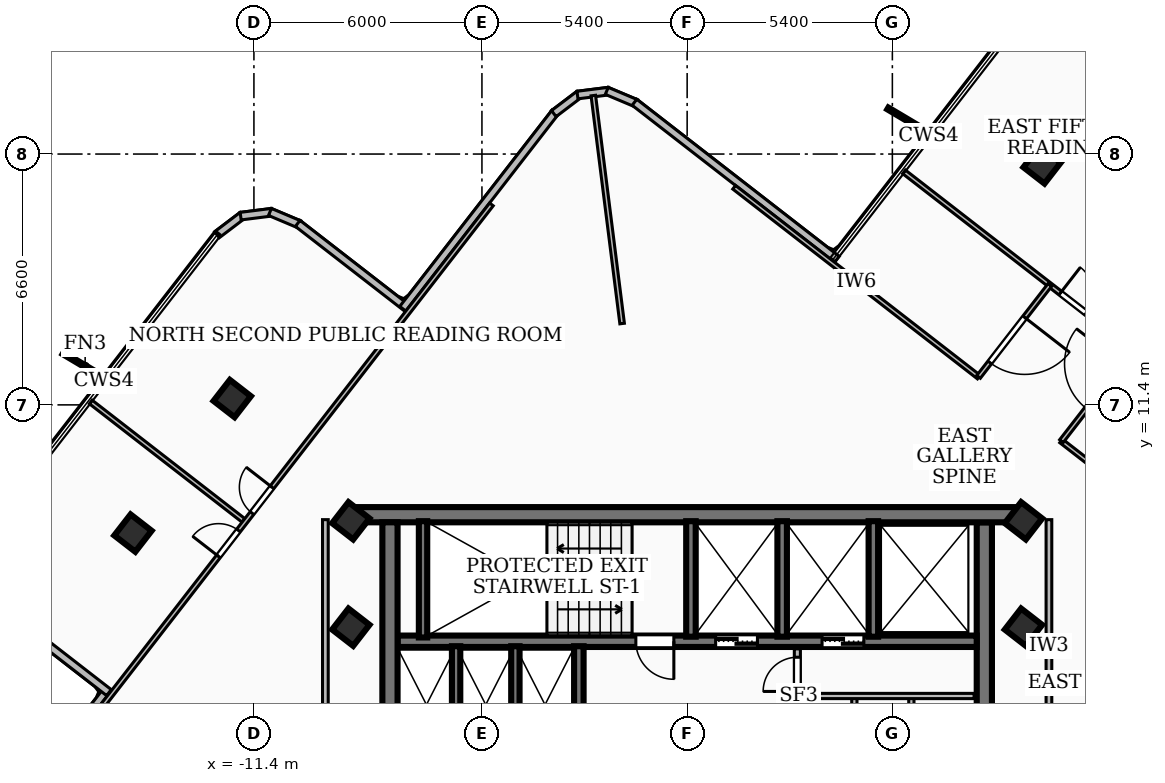
"""IFC4 building model, lengths in metres.
Left out: names, types, materials, properties, quantities, classifications, styles, units other than length and angle.
Written with IfcOpenShell. Run it as: python <this file> out.ifc"""

import sys

from ifc_helpers import new_model, si_unit, direction, frame, frame_2d, origin, origin_2d, place, context, subcontext, project, spatial, rectangle, extrude, element, fill, save


model = new_model("IFC4")
c1 = context("Model", 3, precision=1e-05, world=origin(), true_north=direction((0.0, 1.0)))
c2 = subcontext(c1, "Body", "Model", "MODEL_VIEW")
j1 = project(units=[si_unit("LENGTHUNIT", "METRE"), si_unit("PLANEANGLEUNIT", "RADIAN")], contexts=[c1])
p1 = place(None, origin())
s1 = spatial("IfcSite", under=j1, at=p1, CompositionType="ELEMENT")
p2 = place(p1, origin())
s2 = spatial("IfcBuilding", under=s1, at=p2, CompositionType="ELEMENT")
p3 = place(p2, frame((0.0, 0.0, 261.18)))
s3 = spatial("IfcBuildingStorey", under=s2, at=p3, CompositionType="ELEMENT", Elevation=261.18)
p4 = place(p3, frame((-8.78, 8.51, 0.0), z_axis=(0.0, 0.0, 1.0), x_axis=(1.0, 0.0, 0.0)))
e1 = element("IfcWall", 1, at=p4, inside=s3, PredefinedType="SHEAR", context=c2, shape_type="SweptSolid", body=[
    extrude(rectangle(XDim=17.56, YDim=0.4, at=frame_2d((8.78, 0.0))), origin(), (0.0, 0.0, 1.0), 3.16),
])
for number, where, z_axis, x_axis in (
    (2, (-7.82, 1.95, 0.0), (0.0, 0.0, 1.0), (0.0, 1.0, 0.0)),
    (3, (7.82, 8.31, 0.0), (0.0, 0.0, 1.0), (0.0, -1.0, 0.0)),
):
    element("IfcWall", number, at=place(p3, frame(where, z_axis=z_axis, x_axis=x_axis)), inside=s3, PredefinedType="SHEAR", context=c2, shape_type="SweptSolid", body=[
        extrude(rectangle(XDim=6.36, YDim=0.4, at=frame_2d((3.18, 0.0))), origin(), (0.0, 0.0, 1.0), 3.16),
    ])
p5 = place(p3, frame((7.62, 5.18, 0.0), z_axis=(0.0, 0.0, 1.0), x_axis=(-1.0, 0.0, 0.0)))
e4 = element("IfcWall", 4, at=p5, inside=s3, PredefinedType="SOLIDWALL", context=c2, shape_type="SweptSolid", body=[
    extrude(rectangle(XDim=15.24, YDim=0.3, at=frame_2d((7.62, 0.0))), origin(), (0.0, 0.0, 1.0), 3.16),
])
p6 = place(p5, frame((5.77, 0.0, 0.0)))
e5 = element("IfcOpeningElement", 5, at=p6, cuts=e4, PredefinedType="OPENING", context=c2, shape_type="SweptSolid", body=[
    extrude(rectangle(XDim=1.1, YDim=2.15, at=frame_2d((0.55, 1.075))), frame((0.0, 0.16, 0.0), z_axis=(0.0, -1.0, 0.0), x_axis=(1.0, 0.0, 0.0)), (0.0, 0.0, 1.0), 0.32),
])
p7 = place(p5, frame((2.97, 0.0, 0.0)))
e6 = element("IfcOpeningElement", 6, at=p7, cuts=e4, PredefinedType="OPENING", context=c2, shape_type="SweptSolid", body=[
    extrude(rectangle(XDim=1.1, YDim=2.15, at=frame_2d((0.55, 1.075))), frame((0.0, 0.16, 0.0), z_axis=(0.0, -1.0, 0.0), x_axis=(1.0, 0.0, 0.0)), (0.0, 0.0, 1.0), 0.32),
])
p8 = place(p5, frame((7.97, 0.0, 0.0)))
e7 = element("IfcOpeningElement", 7, at=p8, cuts=e4, PredefinedType="OPENING", context=c2, shape_type="SweptSolid", body=[
    extrude(rectangle(XDim=1.0, YDim=2.1, at=frame_2d((0.5, 1.05))), frame((0.0, 0.16, 0.0), z_axis=(0.0, -1.0, 0.0), x_axis=(1.0, 0.0, 0.0)), (0.0, 0.0, 1.0), 0.32),
])
p9 = place(p3, frame((-6.95, 5.28, 0.0), z_axis=(0.0, 0.0, 1.0), x_axis=(0.0, 1.0, 0.0)))
e8 = element("IfcWall", 8, at=p9, inside=s3, PredefinedType="SOLIDWALL", context=c2, shape_type="SweptSolid", body=[
    extrude(rectangle(XDim=3.06, YDim=0.22, at=frame_2d((1.53, 0.0))), origin(), (0.0, 0.0, 1.0), 3.16),
])
for number, where, z_axis, x_axis in (
    (9, (0.1, 5.3, 0.0), (0.0, 0.0, 1.0), (0.0, 1.0, 0.0)),
    (10, (2.5, 5.3, 0.0), (0.0, 0.0, 1.0), (0.0, 1.0, 0.0)),
    (11, (4.9, 5.3, 0.0), (0.0, 0.0, 1.0), (0.0, 1.0, 0.0)),
):
    element("IfcWall", number, at=place(p3, frame(where, z_axis=z_axis, x_axis=x_axis)), inside=s3, PredefinedType="SOLIDWALL", context=c2, shape_type="SweptSolid", body=[
        extrude(rectangle(XDim=3.04, YDim=0.25, at=frame_2d((1.52, 0.0))), origin(), (0.0, 0.0, 1.0), 3.16),
    ])
p10 = place(p3, frame((-2.85, 1.98, 0.0), z_axis=(0.0, 0.0, 1.0), x_axis=(0.0, 1.0, 0.0)))
e12 = element("IfcWall", 12, at=p10, inside=s3, PredefinedType="SOLIDWALL", context=c2, shape_type="SweptSolid", body=[
    extrude(rectangle(XDim=3.07, YDim=0.25, at=frame_2d((1.535, 0.0))), origin(), (0.0, 0.0, 1.0), 3.16),
])
for number, where, z_axis, x_axis in (
    (13, (-6.08, 1.98, 0.0), (0.0, 0.0, 1.0), (0.0, 1.0, 0.0)),
    (14, (-4.52, 1.98, 0.0), (0.0, 0.0, 1.0), (0.0, 1.0, 0.0)),
):
    element("IfcWall", number, at=place(p3, frame(where, z_axis=z_axis, x_axis=x_axis)), inside=s3, PredefinedType="SOLIDWALL", context=c2, shape_type="SweptSolid", body=[
        extrude(rectangle(XDim=3.07, YDim=0.22, at=frame_2d((1.535, 0.0))), origin(), (0.0, 0.0, 1.0), 3.16),
    ])
for number, where, z_axis, x_axis in (
    (15, (-8.85, 5.55, 0.0), (0.0, 0.0, 1.0), (0.613, 0.79, 0.0)),
    (16, (8.85, 5.55, 0.0), (0.0, 0.0, 1.0), (0.613, 0.79, 0.0)),
    (17, (-8.85, 8.35, 0.0), (0.0, 0.0, 1.0), (0.613, 0.79, 0.0)),
    (18, (8.85, 8.35, 0.0), (0.0, 0.0, 1.0), (0.613, 0.79, 0.0)),
    (19, (9.341, 17.714, 0.0), (0.0, 0.0, 1.0), (0.613, 0.79, 0.0)),
    (20, (-11.971, 11.566, 0.0), (0.0, 0.0, 1.0), (0.613, 0.79, 0.0)),
    (21, (-14.583, 8.026, 0.0), (0.0, 0.0, 1.0), (0.613, 0.79, 0.0)),
):
    element("IfcColumn", number, at=place(p3, frame(where, z_axis=z_axis, x_axis=x_axis)), inside=s3, PredefinedType="COLUMN", context=c2, shape_type="SweptSolid", body=[
        extrude(rectangle(XDim=0.7, YDim=0.7, at=origin_2d()), origin(), (0.0, 0.0, 1.0), 3.42),
    ])
p11 = place(p3, frame((-19.362, -1.386, 0.0), z_axis=(0.0, 0.0, 1.0), x_axis=(0.613007625303, 0.790076990755, 0.0)))
e22 = element("IfcWall", 22, at=p11, inside=s3, PredefinedType="SOLIDWALL", context=c2, shape_type="SweptSolid", body=[
    extrude(rectangle(XDim=6.742, YDim=0.2, at=frame_2d((3.371, 0.0))), origin(), (0.0, 0.0, 1.0), 3.16),
])
p12 = place(p3, frame((-15.215, 3.829, 0.0), z_axis=(0.0, 0.0, 1.0), x_axis=(-0.790311198889, 0.612705646221, 0.0)))
e23 = element("IfcWall", 23, at=p12, inside=s3, PredefinedType="SOLIDWALL", context=c2, shape_type="SweptSolid", body=[
    extrude(rectangle(XDim=3.643, YDim=0.2, at=frame_2d((1.821, 0.0))), origin(), (0.0, 0.0, 1.0), 3.16),
])
p13 = place(p3, frame((-12.372, 15.877, 0.0), z_axis=(0.0, 0.0, 1.0), x_axis=(0.796493049564, 0.60464768419, 0.0)))
e24 = element("IfcWall", 24, at=p13, inside=s3, PredefinedType="SOLIDWALL", context=c2, shape_type="SweptSolid", body=[
    extrude(rectangle(XDim=0.839, YDim=0.2, at=frame_2d((0.419, 0.0))), origin(), (0.0, 0.0, 1.0), 3.16),
])
p14 = place(p3, frame((-11.749, 16.366, 0.0), z_axis=(0.0, 0.0, 1.0), x_axis=(0.992182038023, 0.124799052175, 0.0)))
e25 = element("IfcWall", 25, at=p14, inside=s3, PredefinedType="SOLIDWALL", context=c2, shape_type="SweptSolid", body=[
    extrude(rectangle(XDim=0.825, YDim=0.2, at=frame_2d((0.413, 0.0))), origin(), (0.0, 0.0, 1.0), 3.16),
])
p15 = place(p3, frame((-10.978, 16.476, 0.0), z_axis=(0.0, 0.0, 1.0), x_axis=(0.921328331513, -0.388785423532, 0.0)))
e26 = element("IfcWall", 26, at=p15, inside=s3, PredefinedType="SOLIDWALL", context=c2, shape_type="SweptSolid", body=[
    extrude(rectangle(XDim=0.839, YDim=0.2, at=frame_2d((0.419, 0.0))), origin(), (0.0, 0.0, 1.0), 3.16),
])
p16 = place(p3, frame((-10.248, 16.175, 0.0), z_axis=(0.0, 0.0, 1.0), x_axis=(0.790239683444, -0.612797880797, 0.0)))
e27 = element("IfcWall", 27, at=p16, inside=s3, PredefinedType="SOLIDWALL", context=c2, shape_type="SweptSolid", body=[
    extrude(rectangle(XDim=3.641, YDim=0.2, at=frame_2d((1.82, 0.0))), origin(), (0.0, 0.0, 1.0), 3.16),
])
p17 = place(p3, frame((-7.483, 13.93, 0.0), z_axis=(0.0, 0.0, 1.0), x_axis=(0.612826373036, 0.790217588081, 0.0)))
e28 = element("IfcWall", 28, at=p17, inside=s3, PredefinedType="SOLIDWALL", context=c2, shape_type="SweptSolid", body=[
    extrude(rectangle(XDim=6.542, YDim=0.2, at=frame_2d((3.271, 0.0))), origin(), (0.0, 0.0, 1.0), 3.16),
])
p18 = place(p3, frame((-3.509, 19.064, 0.0), z_axis=(0.0, 0.0, 1.0), x_axis=(0.797053904317, 0.603908166539, 0.0)))
e29 = element("IfcWall", 29, at=p18, inside=s3, PredefinedType="SOLIDWALL", context=c2, shape_type="SweptSolid", body=[
    extrude(rectangle(XDim=0.838, YDim=0.2, at=frame_2d((0.419, 0.0))), origin(), (0.0, 0.0, 1.0), 3.16),
])
p19 = place(p3, frame((-2.886, 19.552, 0.0), z_axis=(0.0, 0.0, 1.0), x_axis=(0.992182038023, 0.124799052175, 0.0)))
e30 = element("IfcWall", 30, at=p19, inside=s3, PredefinedType="SOLIDWALL", context=c2, shape_type="SweptSolid", body=[
    extrude(rectangle(XDim=0.825, YDim=0.2, at=frame_2d((0.413, 0.0))), origin(), (0.0, 0.0, 1.0), 3.16),
])
p20 = place(p3, frame((-2.115, 19.662, 0.0), z_axis=(0.0, 0.0, 1.0), x_axis=(0.921569528133, -0.388213349612, 0.0)))
e31 = element("IfcWall", 31, at=p20, inside=s3, PredefinedType="SOLIDWALL", context=c2, shape_type="SweptSolid", body=[
    extrude(rectangle(XDim=0.838, YDim=0.2, at=frame_2d((0.419, 0.0))), origin(), (0.0, 0.0, 1.0), 3.16),
])
p21 = place(p3, frame((-1.386, 19.362, 0.0), z_axis=(0.0, 0.0, 1.0), x_axis=(0.790076990755, -0.613007625303, 0.0)))
e32 = element("IfcWall", 32, at=p21, inside=s3, PredefinedType="SOLIDWALL", context=c2, shape_type="SweptSolid", body=[
    extrude(rectangle(XDim=6.742, YDim=0.2, at=frame_2d((3.371, 0.0))), origin(), (0.0, 0.0, 1.0), 3.16),
])
p22 = place(p3, frame((2.9, 2.04, 0.0), z_axis=(0.0, 0.0, 1.0), x_axis=(0.0, 1.0, 0.0)))
e33 = element("IfcWall", 33, at=p22, inside=s3, PredefinedType="PARTITIONING", context=c2, shape_type="SweptSolid", body=[
    extrude(rectangle(XDim=2.94, YDim=0.16, at=frame_2d((1.47, 0.0))), origin(), (0.0, 0.0, 1.0), 2.39),
])
p23 = place(p22, frame((1.82, 0.0, 0.0)))
e34 = element("IfcOpeningElement", 34, at=p23, cuts=e33, PredefinedType="OPENING", context=c2, shape_type="SweptSolid", body=[
    extrude(rectangle(XDim=0.9, YDim=2.06, at=frame_2d((0.45, 1.03))), frame((0.0, 0.09, 0.0), z_axis=(0.0, -1.0, 0.0), x_axis=(1.0, 0.0, 0.0)), (0.0, 0.0, 1.0), 0.18),
])
p24 = place(p3, frame((2.9, 3.74, 0.0), z_axis=(0.0, 0.0, 1.0), x_axis=(1.0, 0.0, 0.0)))
e35 = element("IfcWall", 35, at=p24, inside=s3, PredefinedType="PARTITIONING", context=c2, shape_type="SweptSolid", body=[
    extrude(rectangle(XDim=4.65, YDim=0.138, at=frame_2d((2.325, 0.0))), origin(), (0.0, 0.0, 1.0), 3.16),
])
for number, where, z_axis, x_axis in (
    (36, (4.4, 1.85, 0.0), (0.0, 0.0, 1.0), (0.0, 1.0, 0.0)),
    (37, (5.9, 1.85, 0.0), (0.0, 0.0, 1.0), (0.0, 1.0, 0.0)),
):
    element("IfcWall", number, at=place(p3, frame(where, z_axis=z_axis, x_axis=x_axis)), inside=s3, PredefinedType="PARTITIONING", context=c2, shape_type="SweptSolid", body=[
        extrude(rectangle(XDim=1.89, YDim=0.138, at=frame_2d((0.945, 0.0))), origin(), (0.0, 0.0, 1.0), 2.39),
    ])
p25 = place(p3, frame((-9.52, 1.75, 0.0), z_axis=(0.0, 0.0, 1.0), x_axis=(0.0, 1.0, 0.0)))
e38 = element("IfcWall", 38, at=p25, inside=s3, PredefinedType="PARTITIONING", context=c2, shape_type="SweptSolid", body=[
    extrude(rectangle(XDim=6.63, YDim=0.15, at=frame_2d((3.315, 0.0))), origin(), (0.0, 0.0, 1.0), 2.53),
])
p26 = place(p3, frame((9.52, 1.75, 0.0), z_axis=(0.0, 0.0, 1.0), x_axis=(0.0, 1.0, 0.0)))
e39 = element("IfcWall", 39, at=p26, inside=s3, PredefinedType="PARTITIONING", context=c2, shape_type="SweptSolid", body=[
    extrude(rectangle(XDim=6.63, YDim=0.15, at=frame_2d((3.315, 0.0))), origin(), (0.0, 0.0, 1.0), 3.16),
])
p27 = place(p3, frame((-1.711, 13.54, 0.0), z_axis=(0.0, 0.0, 1.0), x_axis=(-0.125366398214, 0.992110511082, 0.0)))
e40 = element("IfcWall", 40, at=p27, inside=s3, PredefinedType="PARTITIONING", context=c2, shape_type="SweptSolid", body=[
    extrude(rectangle(XDim=6.047, YDim=0.12, at=frame_2d((3.023, 0.0))), origin(), (0.0, 0.0, 1.0), 3.16),
])
p28 = place(p3, frame((7.676, 12.131, 0.0), z_axis=(0.0, 0.0, 1.0), x_axis=(-0.790137186805, 0.61293003355, 0.0)))
e41 = element("IfcWall", 41, at=p28, inside=s3, PredefinedType="PARTITIONING", context=c2, shape_type="SweptSolid", body=[
    extrude(rectangle(XDim=8.149, YDim=0.12, at=frame_2d((4.075, 0.0))), origin(), (0.0, 0.0, 1.0), 3.16),
])
p29 = place(p3, frame((16.122, 5.578, 0.0), z_axis=(0.0, 0.0, 1.0), x_axis=(-0.7900346363, 0.613062210094, 0.0)))
e42 = element("IfcWall", 42, at=p29, inside=s3, PredefinedType="PARTITIONING", context=c2, shape_type="SweptSolid", body=[
    extrude(rectangle(XDim=7.95, YDim=0.12, at=frame_2d((3.975, 0.0))), origin(), (0.0, 0.0, 1.0), 2.53),
])
p30 = place(p3, frame((9.544, 14.555, 0.0), z_axis=(0.0, 0.0, 1.0), x_axis=(-0.612990234131, -0.79009048397, 0.0)))
e43 = element("IfcWall", 43, at=p30, inside=s3, PredefinedType="PARTITIONING", context=c2, shape_type="SweptSolid", body=[
    extrude(rectangle(XDim=3.06, YDim=0.12, at=frame_2d((1.53, 0.0))), origin(), (0.0, 0.0, 1.0), 2.53),
])
p31 = place(p30, frame((1.08, 0.0, 0.0)))
e44 = element("IfcOpeningElement", 44, at=p31, cuts=e43, PredefinedType="OPENING", context=c2, shape_type="SweptSolid", body=[
    extrude(rectangle(XDim=1.5, YDim=2.12, at=frame_2d((0.75, 1.06))), frame((0.0, 0.07, 0.0), z_axis=(0.0, -1.0, 0.0), x_axis=(1.0, 0.0, 0.0)), (0.0, 0.0, 1.0), 0.14),
])
p32 = place(p3, frame((9.849, 10.446, 0.0), z_axis=(0.0, 0.0, 1.0), x_axis=(0.612945563076, 0.790125139902, 0.0)))
e45 = element("IfcWall", 45, at=p32, inside=s3, PredefinedType="PARTITIONING", context=c2, shape_type="SweptSolid", body=[
    extrude(rectangle(XDim=3.059, YDim=0.12, at=frame_2d((1.53, 0.0))), origin(), (0.0, 0.0, 1.0), 3.16),
])
p33 = place(p32, frame((1.08, 0.0, 0.0)))
e46 = element("IfcOpeningElement", 46, at=p33, cuts=e45, PredefinedType="OPENING", context=c2, shape_type="SweptSolid", body=[
    extrude(rectangle(XDim=1.5, YDim=2.12, at=frame_2d((0.75, 1.06))), frame((0.0, 0.07, 0.0), z_axis=(0.0, -1.0, 0.0), x_axis=(1.0, 0.0, 0.0)), (0.0, 0.0, 1.0), 0.14),
])
p34 = place(p3, frame((5.707, 17.531, 0.0), z_axis=(0.0, 0.0, 1.0), x_axis=(0.790153529347, -0.612908965557, 0.0)))
e47 = element("IfcWall", 47, at=p34, inside=s3, PredefinedType="PARTITIONING", context=c2, shape_type="SweptSolid", body=[
    extrude(rectangle(XDim=12.671, YDim=0.12, at=frame_2d((6.335, 0.0))), origin(), (0.0, 0.0, 1.0), 2.53),
])
p35 = place(p34, frame((6.405, 0.0, 0.0)))
e48 = element("IfcOpeningElement", 48, at=p35, cuts=e47, PredefinedType="OPENING", context=c2, shape_type="SweptSolid", body=[
    extrude(rectangle(XDim=0.86, YDim=2.04, at=frame_2d((0.43, 1.02))), frame((0.0, 0.07, 0.0), z_axis=(0.0, -1.0, 0.0), x_axis=(1.0, 0.0, 0.0)), (0.0, 0.0, 1.0), 0.14),
])
p36 = place(p34, frame((5.205, 0.0, 0.0)))
e49 = element("IfcOpeningElement", 49, at=p36, cuts=e47, PredefinedType="OPENING", context=c2, shape_type="SweptSolid", body=[
    extrude(rectangle(XDim=0.86, YDim=2.04, at=frame_2d((0.43, 1.02))), frame((0.0, 0.07, 0.0), z_axis=(0.0, -1.0, 0.0), x_axis=(1.0, 0.0, 0.0)), (0.0, 0.0, 1.0), 0.14),
])
p37 = place(p3, frame((-11.676, 8.361, 0.0), z_axis=(0.0, 0.0, 1.0), x_axis=(-0.790227868115, 0.612813117071, 0.0)))
e50 = element("IfcWall", 50, at=p37, inside=s3, PredefinedType="PARTITIONING", context=c2, shape_type="SweptSolid", body=[
    extrude(rectangle(XDim=5.085, YDim=0.12, at=frame_2d((2.542, 0.0))), origin(), (0.0, 0.0, 1.0), 3.16),
])
p38 = place(p3, frame((-17.555, 0.683, 0.0), z_axis=(0.0, 0.0, 1.0), x_axis=(0.61291959311, 0.790145285617, 0.0)))
e51 = element("IfcWall", 51, at=p38, inside=s3, PredefinedType="PARTITIONING", context=c2, shape_type="SweptSolid", body=[
    extrude(rectangle(XDim=20.239, YDim=0.12, at=frame_2d((10.12, 0.0))), origin(), (0.0, 0.0, 1.0), 2.53),
])
p39 = place(p38, frame((9.96, 0.0, 0.0)))
e52 = element("IfcOpeningElement", 52, at=p39, cuts=e51, PredefinedType="OPENING", context=c2, shape_type="SweptSolid", body=[
    extrude(rectangle(XDim=0.86, YDim=2.04, at=frame_2d((0.43, 1.02))), frame((0.0, 0.07, 0.0), z_axis=(0.0, -1.0, 0.0), x_axis=(1.0, 0.0, 0.0)), (0.0, 0.0, 1.0), 0.14),
])
p40 = place(p38, frame((8.52, 0.0, 0.0)))
e53 = element("IfcOpeningElement", 53, at=p40, cuts=e51, PredefinedType="OPENING", context=c2, shape_type="SweptSolid", body=[
    extrude(rectangle(XDim=0.86, YDim=2.04, at=frame_2d((0.43, 1.02))), frame((0.0, 0.07, 0.0), z_axis=(0.0, -1.0, 0.0), x_axis=(1.0, 0.0, 0.0)), (0.0, 0.0, 1.0), 0.14),
])
p41 = place(p6, origin())
e54 = element("IfcDoor", 54, at=p41, inside=s3, OperationType="DOUBLE_DOOR_SLIDING", PredefinedType="DOOR", context=c2, shape_type="SweptSolid", body=[
    extrude(rectangle(XDim=1.1, YDim=2.15, at=frame_2d((0.55, 1.075))), frame((0.0, 0.025, 0.0), z_axis=(0.0, -1.0, 0.0), x_axis=(1.0, 0.0, 0.0)), (0.0, 0.0, 1.0), 0.05),
])
fill(e5, e54)
p42 = place(p7, origin())
e55 = element("IfcDoor", 55, at=p42, inside=s3, OperationType="DOUBLE_DOOR_SLIDING", PredefinedType="DOOR", context=c2, shape_type="SweptSolid", body=[
    extrude(rectangle(XDim=1.1, YDim=2.15, at=frame_2d((0.55, 1.075))), frame((0.0, 0.025, 0.0), z_axis=(0.0, -1.0, 0.0), x_axis=(1.0, 0.0, 0.0)), (0.0, 0.0, 1.0), 0.05),
])
fill(e6, e55)
p43 = place(p8, origin())
e56 = element("IfcDoor", 56, at=p43, inside=s3, OperationType="SINGLE_SWING_LEFT", PredefinedType="DOOR", context=c2, shape_type="SweptSolid", body=[
    extrude(rectangle(XDim=1.0, YDim=2.1, at=frame_2d((0.5, 1.05))), frame((0.0, 0.025, 0.0), z_axis=(0.0, -1.0, 0.0), x_axis=(1.0, 0.0, 0.0)), (0.0, 0.0, 1.0), 0.05),
])
fill(e7, e56)
p44 = place(p23, origin())
e57 = element("IfcDoor", 57, at=p44, inside=s3, OperationType="SINGLE_SWING_LEFT", PredefinedType="DOOR", context=c2, shape_type="SweptSolid", body=[
    extrude(rectangle(XDim=0.9, YDim=2.06, at=frame_2d((0.45, 1.03))), frame((0.0, 0.025, 0.0), z_axis=(0.0, -1.0, 0.0), x_axis=(1.0, 0.0, 0.0)), (0.0, 0.0, 1.0), 0.05),
])
fill(e34, e57)
p45 = place(p31, origin())
e58 = element("IfcDoor", 58, at=p45, inside=s3, OperationType="SINGLE_SWING_LEFT", PredefinedType="DOOR", context=c2, shape_type="SweptSolid", body=[
    extrude(rectangle(XDim=1.5, YDim=2.12, at=frame_2d((0.75, 1.06))), frame((0.0, 0.025, 0.0), z_axis=(0.0, -1.0, 0.0), x_axis=(1.0, 0.0, 0.0)), (0.0, 0.0, 1.0), 0.05),
])
fill(e44, e58)
p46 = place(p36, origin())
e59 = element("IfcDoor", 59, at=p46, inside=s3, OperationType="SINGLE_SWING_LEFT", PredefinedType="DOOR", context=c2, shape_type="SweptSolid", body=[
    extrude(rectangle(XDim=0.86, YDim=2.04, at=frame_2d((0.43, 1.02))), frame((0.0, 0.025, 0.0), z_axis=(0.0, -1.0, 0.0), x_axis=(1.0, 0.0, 0.0)), (0.0, 0.0, 1.0), 0.05),
])
fill(e49, e59)
p47 = place(p39, origin())
e60 = element("IfcDoor", 60, at=p47, inside=s3, OperationType="SINGLE_SWING_RIGHT", PredefinedType="DOOR", context=c2, shape_type="SweptSolid", body=[
    extrude(rectangle(XDim=0.86, YDim=2.04, at=frame_2d((0.43, 1.02))), frame((0.0, 0.025, 0.0), z_axis=(0.0, -1.0, 0.0), x_axis=(1.0, 0.0, 0.0)), (0.0, 0.0, 1.0), 0.05),
])
fill(e52, e60)
p48 = place(p40, origin())
e61 = element("IfcDoor", 61, at=p48, inside=s3, OperationType="SINGLE_SWING_LEFT", PredefinedType="DOOR", context=c2, shape_type="SweptSolid", body=[
    extrude(rectangle(XDim=0.86, YDim=2.04, at=frame_2d((0.43, 1.02))), frame((0.0, 0.025, 0.0), z_axis=(0.0, -1.0, 0.0), x_axis=(1.0, 0.0, 0.0)), (0.0, 0.0, 1.0), 0.05),
])
fill(e53, e61)
save(model, sys.argv[1])
